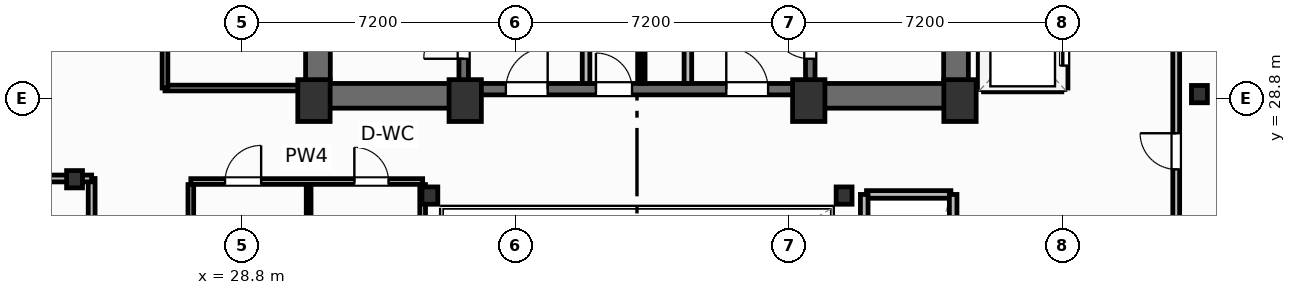
"""IFC4 building model, lengths in metres.
Left out: names, types, materials, properties, quantities, classifications, styles, units other than length and angle.
Written with IfcOpenShell. Run it as: python <this file> out.ifc"""

import sys

from ifc_helpers import new_model, si_unit, direction, frame, frame_2d, origin, origin_2d, place, context, subcontext, project, spatial, rectangle, i_section, extrude, element, fill, save


model = new_model("IFC4")
c1 = context("Model", 3, precision=1e-05, world=origin(), true_north=direction((0.0, 1.0)))
c2 = subcontext(c1, "Body", "Model", "MODEL_VIEW")
j1 = project(units=[si_unit("LENGTHUNIT", "METRE"), si_unit("PLANEANGLEUNIT", "RADIAN")], contexts=[c1])
p1 = place(None, origin())
s1 = spatial("IfcSite", under=j1, at=p1, CompositionType="ELEMENT")
p2 = place(p1, origin())
s2 = spatial("IfcBuilding", under=s1, at=p2, CompositionType="ELEMENT")
p3 = place(p2, frame((0.0, 0.0, 170.9)))
s3 = spatial("IfcBuildingStorey", under=s2, at=p3, CompositionType="ELEMENT", Elevation=170.9)
for number, where, z_axis, x_axis in (
    (1, (30.7, 28.75, 0.0), (0.0, 0.0, 1.0), (1.0, 0.0, 0.0)),
    (2, (34.68, 28.75, 0.0), (0.0, 0.0, 1.0), (1.0, 0.0, 0.0)),
    (3, (43.72, 28.75, 0.0), (0.0, 0.0, 1.0), (1.0, 0.0, 0.0)),
    (4, (47.7, 28.75, 0.0), (0.0, 0.0, 1.0), (1.0, 0.0, 0.0)),
):
    element("IfcColumn", number, at=place(p3, frame(where, z_axis=z_axis, x_axis=x_axis)), inside=s3, PredefinedType="COLUMN", context=c2, shape_type="SweptSolid", body=[
        extrude(rectangle(XDim=0.85, YDim=1.1, at=origin_2d()), origin(), (0.0, 0.0, 1.0), 3.7),
    ])
for number, where, z_axis, x_axis in (
    (5, (33.75, 26.25, 0.0), (0.0, 0.0, 1.0), (1.0, 0.0, 0.0)),
    (6, (44.65, 26.25, 0.0), (0.0, 0.0, 1.0), (1.0, 0.0, 0.0)),
    (7, (24.4, 26.68, 0.0), (0.0, 0.0, 1.0), (1.0, 0.0, 0.0)),
    (8, (54.0, 28.92, 0.0), (0.0, 0.0, 1.0), (1.0, 0.0, 0.0)),
):
    element("IfcColumn", number, at=place(p3, frame(where, z_axis=z_axis, x_axis=x_axis)), inside=s3, PredefinedType="COLUMN", context=c2, shape_type="SweptSolid", body=[
        extrude(i_section(OverallWidth=0.418, OverallDepth=0.455, WebThickness=0.042, FlangeThickness=0.068, FilletRadius=0.025, at=origin_2d()), origin(), (0.0, 0.0, 1.0), 3.7),
    ])
for number, where, z_axis, x_axis in (
    (9, (30.805, 29.2, 0.0), (0.0, 0.0, 1.0), (0.0, 1.0, 0.0)),
    (10, (47.595, 29.2, 0.0), (0.0, 0.0, 1.0), (0.0, 1.0, 0.0)),
):
    element("IfcWall", number, at=place(p3, frame(where, z_axis=z_axis, x_axis=x_axis)), inside=s3, PredefinedType="SHEAR", context=c2, shape_type="SweptSolid", body=[
        extrude(rectangle(XDim=9.22, YDim=0.65, at=frame_2d((4.61, 0.0))), origin(), (0.0, 0.0, 1.0), 3.45),
    ])
p4 = place(p3, frame((30.48, 28.875, 0.0), z_axis=(0.0, 0.0, 1.0), x_axis=(1.0, 0.0, 0.0)))
e11 = element("IfcWall", 11, at=p4, inside=s3, PredefinedType="SHEAR", context=c2, shape_type="SweptSolid", body=[
    extrude(rectangle(XDim=4.32, YDim=0.65, at=frame_2d((2.16, 0.0))), origin(), (0.0, 0.0, 1.0), 3.45),
])
p5 = place(p3, frame((43.6, 28.875, 0.0), z_axis=(0.0, 0.0, 1.0), x_axis=(1.0, 0.0, 0.0)))
e12 = element("IfcWall", 12, at=p5, inside=s3, PredefinedType="SHEAR", context=c2, shape_type="SweptSolid", body=[
    extrude(rectangle(XDim=4.32, YDim=0.65, at=frame_2d((2.16, 0.0))), origin(), (0.0, 0.0, 1.0), 3.45),
])
p6 = place(p3, frame((34.8, 29.05, 0.0), z_axis=(0.0, 0.0, 1.0), x_axis=(1.0, 0.0, 0.0)))
e13 = element("IfcWall", 13, at=p6, inside=s3, PredefinedType="SHEAR", context=c2, shape_type="SweptSolid", body=[
    extrude(rectangle(XDim=8.8, YDim=0.3, at=frame_2d((4.4, 0.0))), origin(), (0.0, 0.0, 1.0), 3.45),
])
p7 = place(p6, frame((0.95, 0.0, 0.0)))
e14 = element("IfcOpeningElement", 14, at=p7, cuts=e13, PredefinedType="OPENING", context=c2, shape_type="SweptSolid", body=[
    extrude(rectangle(XDim=1.1, YDim=2.15, at=frame_2d((0.55, 1.075))), frame((0.0, 0.16, 0.0), z_axis=(0.0, -1.0, 0.0), x_axis=(1.0, 0.0, 0.0)), (0.0, 0.0, 1.0), 0.32),
])
p8 = place(p6, frame((6.75, 0.0, 0.0)))
e15 = element("IfcOpeningElement", 15, at=p8, cuts=e13, PredefinedType="OPENING", context=c2, shape_type="SweptSolid", body=[
    extrude(rectangle(XDim=1.1, YDim=2.15, at=frame_2d((0.55, 1.075))), frame((0.0, 0.16, 0.0), z_axis=(0.0, -1.0, 0.0), x_axis=(1.0, 0.0, 0.0)), (0.0, 0.0, 1.0), 0.32),
])
p9 = place(p6, frame((3.32, 0.0, 0.0)))
e16 = element("IfcOpeningElement", 16, at=p9, cuts=e13, PredefinedType="OPENING", context=c2, shape_type="SweptSolid", body=[
    extrude(rectangle(XDim=0.95, YDim=2.15, at=frame_2d((0.475, 1.075))), frame((0.0, 0.16, 0.0), z_axis=(0.0, -1.0, 0.0), x_axis=(1.0, 0.0, 0.0)), (0.0, 0.0, 1.0), 0.32),
])
p10 = place(p3, frame((34.64, 29.2, 0.0), z_axis=(0.0, 0.0, 1.0), x_axis=(0.0, 1.0, 0.0)))
e17 = element("IfcWall", 17, at=p10, inside=s3, PredefinedType="SHEAR", context=c2, shape_type="SweptSolid", body=[
    extrude(rectangle(XDim=9.22, YDim=0.25, at=frame_2d((4.61, 0.0))), origin(), (0.0, 0.0, 1.0), 3.45),
])
p11 = place(p10, frame((0.65, 0.0, 0.0)))
e18 = element("IfcOpeningElement", 18, at=p11, cuts=e17, PredefinedType="OPENING", context=c2, shape_type="SweptSolid", body=[
    extrude(rectangle(XDim=1.05, YDim=2.15, at=frame_2d((0.525, 1.075))), frame((0.0, 0.135, 0.0), z_axis=(0.0, -1.0, 0.0), x_axis=(1.0, 0.0, 0.0)), (0.0, 0.0, 1.0), 0.27),
])
p12 = place(p3, frame((43.76, 29.2, 0.0), z_axis=(0.0, 0.0, 1.0), x_axis=(0.0, 1.0, 0.0)))
e19 = element("IfcWall", 19, at=p12, inside=s3, PredefinedType="SHEAR", context=c2, shape_type="SweptSolid", body=[
    extrude(rectangle(XDim=9.22, YDim=0.25, at=frame_2d((4.61, 0.0))), origin(), (0.0, 0.0, 1.0), 3.45),
])
p13 = place(p12, frame((0.65, 0.0, 0.0)))
e20 = element("IfcOpeningElement", 20, at=p13, cuts=e19, PredefinedType="OPENING", context=c2, shape_type="SweptSolid", body=[
    extrude(rectangle(XDim=1.05, YDim=2.15, at=frame_2d((0.525, 1.075))), frame((0.0, 0.135, 0.0), z_axis=(0.0, -1.0, 0.0), x_axis=(1.0, 0.0, 0.0)), (0.0, 0.0, 1.0), 0.27),
])
p14 = place(p3, frame((24.85, 19.2, 0.0), z_axis=(0.0, 0.0, 1.0), x_axis=(0.0, 1.0, 0.0)))
e21 = element("IfcWall", 21, at=p14, inside=s3, PredefinedType="PARTITIONING", context=c2, shape_type="SweptSolid", body=[
    extrude(rectangle(XDim=7.5, YDim=0.18, at=frame_2d((3.75, 0.0))), origin(), (0.0, 0.0, 1.0), 3.45),
])
p15 = place(p14, frame((3.275, 0.0, 0.0)))
e22 = element("IfcOpeningElement", 22, at=p15, cuts=e21, PredefinedType="OPENING", context=c2, shape_type="SweptSolid", body=[
    extrude(rectangle(XDim=0.95, YDim=2.05, at=frame_2d((0.475, 1.025))), frame((0.0, 0.1, 0.0), z_axis=(0.0, -1.0, 0.0), x_axis=(1.0, 0.0, 0.0)), (0.0, 0.0, 1.0), 0.2),
])
p16 = place(p3, frame((3.653, 26.7, 0.0), z_axis=(0.0, 0.0, 1.0), x_axis=(1.0, 0.0, 0.0)))
e23 = element("IfcWall", 23, at=p16, inside=s3, PredefinedType="PARTITIONING", context=c2, shape_type="SweptSolid", body=[
    extrude(rectangle(XDim=21.197, YDim=0.18, at=frame_2d((10.599, 0.0))), origin(), (0.0, 0.0, 1.0), 2.662),
])
p17 = place(p3, frame((53.39, 19.24, 0.0), z_axis=(0.0, 0.0, 1.0), x_axis=(0.0, 1.0, 0.0)))
e24 = element("IfcWall", 24, at=p17, inside=s3, PredefinedType="PARTITIONING", context=c2, shape_type="SweptSolid", body=[
    extrude(rectangle(XDim=20.06, YDim=0.18, at=frame_2d((10.03, 0.0))), origin(), (0.0, 0.0, 1.0), 3.45),
])
p18 = place(p17, frame((7.7, 0.0, 0.0)))
e25 = element("IfcOpeningElement", 25, at=p18, cuts=e24, PredefinedType="OPENING", context=c2, shape_type="SweptSolid", body=[
    extrude(rectangle(XDim=0.95, YDim=2.05, at=frame_2d((0.475, 1.025))), frame((0.0, 0.1, 0.0), z_axis=(0.0, -1.0, 0.0), x_axis=(1.0, 0.0, 0.0)), (0.0, 0.0, 1.0), 0.2),
])
for number, where, z_axis, x_axis in (
    (26, (37.86, 29.2, 0.0), (0.0, 0.0, 1.0), (0.0, 1.0, 0.0)),
    (27, (40.54, 29.2, 0.0), (0.0, 0.0, 1.0), (0.0, 1.0, 0.0)),
):
    element("IfcWall", number, at=place(p3, frame(where, z_axis=z_axis, x_axis=x_axis)), inside=s3, PredefinedType="PARTITIONING", context=c2, shape_type="SweptSolid", body=[
        extrude(rectangle(XDim=5.18, YDim=0.2, at=frame_2d((2.59, 0.0))), origin(), (0.0, 0.0, 1.0), 3.45),
    ])
p19 = place(p3, frame((39.35, 29.2, 0.0), z_axis=(0.0, 0.0, 1.0), x_axis=(0.0, 1.0, 0.0)))
e28 = element("IfcWall", 28, at=p19, inside=s3, PredefinedType="PARTITIONING", context=c2, shape_type="SweptSolid", body=[
    extrude(rectangle(XDim=5.22, YDim=0.125, at=frame_2d((2.61, 0.0))), origin(), (0.0, 0.0, 1.0), 3.45),
])
p20 = place(p19, frame((2.05, 0.0, 0.0)))
e29 = element("IfcOpeningElement", 29, at=p20, cuts=e28, PredefinedType="OPENING", context=c2, shape_type="SweptSolid", body=[
    extrude(rectangle(XDim=0.85, YDim=2.05, at=frame_2d((0.425, 1.025))), frame((0.0, 0.073, 0.0), z_axis=(0.0, -1.0, 0.0), x_axis=(1.0, 0.0, 0.0)), (0.0, 0.0, 1.0), 0.145),
])
p21 = place(p3, frame((27.46, 26.62, 0.0), z_axis=(0.0, 0.0, 1.0), x_axis=(1.0, 0.0, 0.0)))
e30 = element("IfcWall", 30, at=p21, inside=s3, PredefinedType="PARTITIONING", context=c2, shape_type="SweptSolid", body=[
    extrude(rectangle(XDim=6.1, YDim=0.15, at=frame_2d((3.05, 0.0))), origin(), (0.0, 0.0, 1.0), 2.662),
])
p22 = place(p21, frame((0.9, 0.0, 0.0)))
e31 = element("IfcOpeningElement", 31, at=p22, cuts=e30, PredefinedType="OPENING", context=c2, shape_type="SweptSolid", body=[
    extrude(rectangle(XDim=0.95, YDim=2.05, at=frame_2d((0.475, 1.025))), frame((0.0, 0.085, 0.0), z_axis=(0.0, -1.0, 0.0), x_axis=(1.0, 0.0, 0.0)), (0.0, 0.0, 1.0), 0.17),
])
p23 = place(p21, frame((4.303, 0.0, 0.0)))
e32 = element("IfcOpeningElement", 32, at=p23, cuts=e30, PredefinedType="OPENING", context=c2, shape_type="SweptSolid", body=[
    extrude(rectangle(XDim=0.9, YDim=2.05, at=frame_2d((0.45, 1.025))), frame((0.0, 0.085, 0.0), z_axis=(0.0, -1.0, 0.0), x_axis=(1.0, 0.0, 0.0)), (0.0, 0.0, 1.0), 0.17),
])
p24 = place(p3, frame((30.56, 19.38, 0.0), z_axis=(0.0, 0.0, 1.0), x_axis=(0.0, 1.0, 0.0)))
e33 = element("IfcWall", 33, at=p24, inside=s3, PredefinedType="PARTITIONING", context=c2, shape_type="SweptSolid", body=[
    extrude(rectangle(XDim=7.16, YDim=0.125, at=frame_2d((3.58, 0.0))), origin(), (0.0, 0.0, 1.0), 3.45),
])
p25 = place(p24, frame((1.4, 0.0, 0.0)))
e34 = element("IfcOpeningElement", 34, at=p25, cuts=e33, PredefinedType="OPENING", context=c2, shape_type="SweptSolid", body=[
    extrude(rectangle(XDim=0.92, YDim=2.05, at=frame_2d((0.46, 1.025))), frame((0.0, 0.073, 0.0), z_axis=(0.0, -1.0, 0.0), x_axis=(1.0, 0.0, 0.0)), (0.0, 0.0, 1.0), 0.145),
])
p26 = place(p3, frame((27.46, 19.38, 0.0), z_axis=(0.0, 0.0, 1.0), x_axis=(0.0, 1.0, 0.0)))
e35 = element("IfcWall", 35, at=p26, inside=s3, PredefinedType="PARTITIONING", context=c2, shape_type="SweptSolid", body=[
    extrude(rectangle(XDim=7.16, YDim=0.15, at=frame_2d((3.58, 0.0))), origin(), (0.0, 0.0, 1.0), 3.45),
])
p27 = place(p3, frame((33.56, 19.38, 0.0), z_axis=(0.0, 0.0, 1.0), x_axis=(0.0, 1.0, 0.0)))
e36 = element("IfcWall", 36, at=p27, inside=s3, PredefinedType="PARTITIONING", context=c2, shape_type="SweptSolid", body=[
    extrude(rectangle(XDim=7.16, YDim=0.15, at=frame_2d((3.58, 0.0))), origin(), (0.0, 0.0, 1.0), 2.824),
])
p28 = place(p3, frame((26.78, 29.08, 0.0), z_axis=(0.0, 0.0, 1.0), x_axis=(1.0, 0.0, 0.0)))
e37 = element("IfcWall", 37, at=p28, inside=s3, PredefinedType="PARTITIONING", context=c2, shape_type="SweptSolid", body=[
    extrude(rectangle(XDim=3.7, YDim=0.15, at=frame_2d((1.85, 0.0))), origin(), (0.0, 0.0, 1.0), 3.45),
])
p29 = place(p3, frame((26.78, 29.08, 0.0), z_axis=(0.0, 0.0, 1.0), x_axis=(0.0, 1.0, 0.0)))
e38 = element("IfcWall", 38, at=p29, inside=s3, PredefinedType="PARTITIONING", context=c2, shape_type="SweptSolid", body=[
    extrude(rectangle(XDim=9.18, YDim=0.15, at=frame_2d((4.59, 0.0))), origin(), (0.0, 0.0, 1.0), 3.45),
])
p30 = place(p29, frame((2.4, 0.0, 0.0)))
e39 = element("IfcOpeningElement", 39, at=p30, cuts=e38, PredefinedType="OPENING", context=c2, shape_type="SweptSolid", body=[
    extrude(rectangle(XDim=0.95, YDim=2.05, at=frame_2d((0.475, 1.025))), frame((0.0, 0.085, 0.0), z_axis=(0.0, -1.0, 0.0), x_axis=(1.0, 0.0, 0.0)), (0.0, 0.0, 1.0), 0.17),
])
p31 = place(p3, frame((48.32, 29.08, 0.0), z_axis=(0.0, 0.0, 1.0), x_axis=(1.0, 0.0, 0.0)))
e40 = element("IfcWall", 40, at=p31, inside=s3, PredefinedType="PARTITIONING", context=c2, shape_type="SweptSolid", body=[
    extrude(rectangle(XDim=2.06, YDim=0.2, at=frame_2d((1.03, 0.0))), origin(), (0.0, 0.0, 1.0), 2.662),
])
p32 = place(p3, frame((48.28, 29.08, 0.0), z_axis=(0.0, 0.0, 1.0), x_axis=(0.0, 1.0, 0.0)))
e41 = element("IfcWall", 41, at=p32, inside=s3, PredefinedType="PARTITIONING", context=c2, shape_type="SweptSolid", body=[
    extrude(rectangle(XDim=6.89, YDim=0.2, at=frame_2d((3.445, 0.0))), origin(), (0.0, 0.0, 1.0), 3.45),
])
p33 = place(p3, frame((50.44, 29.08, 0.0), z_axis=(0.0, 0.0, 1.0), x_axis=(0.0, 1.0, 0.0)))
e42 = element("IfcWall", 42, at=p33, inside=s3, PredefinedType="PARTITIONING", context=c2, shape_type="SweptSolid", body=[
    extrude(rectangle(XDim=6.89, YDim=0.2, at=frame_2d((3.445, 0.0))), origin(), (0.0, 0.0, 1.0), 3.45),
])
p34 = place(p33, frame((0.59, 0.0, 0.0)))
e43 = element("IfcOpeningElement", 43, at=p34, cuts=e42, PredefinedType="OPENING", context=c2, shape_type="SweptSolid", body=[
    extrude(rectangle(XDim=1.1, YDim=2.15, at=frame_2d((0.55, 1.075))), frame((0.0, 0.11, 0.0), z_axis=(0.0, -1.0, 0.0), x_axis=(1.0, 0.0, 0.0)), (0.0, 0.0, 1.0), 0.22),
])
p35 = place(p33, frame((2.89, 0.0, 0.0)))
e44 = element("IfcOpeningElement", 44, at=p35, cuts=e42, PredefinedType="OPENING", context=c2, shape_type="SweptSolid", body=[
    extrude(rectangle(XDim=1.1, YDim=2.15, at=frame_2d((0.55, 1.075))), frame((0.0, 0.11, 0.0), z_axis=(0.0, -1.0, 0.0), x_axis=(1.0, 0.0, 0.0)), (0.0, 0.0, 1.0), 0.22),
])
p36 = place(p33, frame((5.19, 0.0, 0.0)))
e45 = element("IfcOpeningElement", 45, at=p36, cuts=e42, PredefinedType="OPENING", context=c2, shape_type="SweptSolid", body=[
    extrude(rectangle(XDim=1.1, YDim=2.15, at=frame_2d((0.55, 1.075))), frame((0.0, 0.11, 0.0), z_axis=(0.0, -1.0, 0.0), x_axis=(1.0, 0.0, 0.0)), (0.0, 0.0, 1.0), 0.22),
])
p37 = place(p3, frame((45.24, 26.28, 0.0), z_axis=(0.0, 0.0, 1.0), x_axis=(1.0, 0.0, 0.0)))
e46 = element("IfcWall", 46, at=p37, inside=s3, PredefinedType="PARTITIONING", context=c2, shape_type="SweptSolid", body=[
    extrude(rectangle(XDim=2.22, YDim=0.2, at=frame_2d((1.11, 0.0))), origin(), (0.0, 0.0, 1.0), 3.45),
])
for number, where, z_axis, x_axis in (
    (47, (45.18, 19.38, 0.0), (0.0, 0.0, 1.0), (0.0, 1.0, 0.0)),
    (48, (47.52, 19.38, 0.0), (0.0, 0.0, 1.0), (0.0, 1.0, 0.0)),
):
    element("IfcWall", number, at=place(p3, frame(where, z_axis=z_axis, x_axis=x_axis)), inside=s3, PredefinedType="PARTITIONING", context=c2, shape_type="SweptSolid", body=[
        extrude(rectangle(XDim=6.9, YDim=0.2, at=frame_2d((3.45, 0.0))), origin(), (0.0, 0.0, 1.0), 3.45),
    ])
p38 = place(p18, origin())
e49 = element("IfcDoor", 49, at=p38, inside=s3, OperationType="SINGLE_SWING_RIGHT", PredefinedType="DOOR", context=c2, shape_type="SweptSolid", body=[
    extrude(rectangle(XDim=0.95, YDim=2.05, at=frame_2d((0.475, 1.025))), frame((0.0, 0.025, 0.0), z_axis=(0.0, -1.0, 0.0), x_axis=(1.0, 0.0, 0.0)), (0.0, 0.0, 1.0), 0.05),
])
fill(e25, e49)
p39 = place(p11, origin())
e50 = element("IfcDoor", 50, at=p39, inside=s3, OperationType="SINGLE_SWING_LEFT", PredefinedType="DOOR", context=c2, shape_type="SweptSolid", body=[
    extrude(rectangle(XDim=1.05, YDim=2.15, at=frame_2d((0.525, 1.075))), frame((0.0, 0.025, 0.0), z_axis=(0.0, -1.0, 0.0), x_axis=(1.0, 0.0, 0.0)), (0.0, 0.0, 1.0), 0.05),
])
fill(e18, e50)
p40 = place(p13, origin())
e51 = element("IfcDoor", 51, at=p40, inside=s3, OperationType="SINGLE_SWING_RIGHT", PredefinedType="DOOR", context=c2, shape_type="SweptSolid", body=[
    extrude(rectangle(XDim=1.05, YDim=2.15, at=frame_2d((0.525, 1.075))), frame((0.0, 0.025, 0.0), z_axis=(0.0, -1.0, 0.0), x_axis=(1.0, 0.0, 0.0)), (0.0, 0.0, 1.0), 0.05),
])
fill(e20, e51)
p41 = place(p7, origin())
e52 = element("IfcDoor", 52, at=p41, inside=s3, OperationType="SINGLE_SWING_RIGHT", PredefinedType="DOOR", context=c2, shape_type="SweptSolid", body=[
    extrude(rectangle(XDim=1.1, YDim=2.15, at=frame_2d((0.55, 1.075))), frame((0.0, 0.025, 0.0), z_axis=(0.0, -1.0, 0.0), x_axis=(1.0, 0.0, 0.0)), (0.0, 0.0, 1.0), 0.05),
])
fill(e14, e52)
p42 = place(p8, origin())
e53 = element("IfcDoor", 53, at=p42, inside=s3, OperationType="SINGLE_SWING_LEFT", PredefinedType="DOOR", context=c2, shape_type="SweptSolid", body=[
    extrude(rectangle(XDim=1.1, YDim=2.15, at=frame_2d((0.55, 1.075))), frame((0.0, 0.025, 0.0), z_axis=(0.0, -1.0, 0.0), x_axis=(1.0, 0.0, 0.0)), (0.0, 0.0, 1.0), 0.05),
])
fill(e15, e53)
p43 = place(p9, origin())
e54 = element("IfcDoor", 54, at=p43, inside=s3, OperationType="SINGLE_SWING_LEFT", PredefinedType="DOOR", context=c2, shape_type="SweptSolid", body=[
    extrude(rectangle(XDim=0.95, YDim=2.15, at=frame_2d((0.475, 1.075))), frame((0.0, 0.025, 0.0), z_axis=(0.0, -1.0, 0.0), x_axis=(1.0, 0.0, 0.0)), (0.0, 0.0, 1.0), 0.05),
])
fill(e16, e54)
p44 = place(p22, origin())
e55 = element("IfcDoor", 55, at=p44, inside=s3, OperationType="SINGLE_SWING_RIGHT", PredefinedType="DOOR", context=c2, shape_type="SweptSolid", body=[
    extrude(rectangle(XDim=0.95, YDim=2.05, at=frame_2d((0.475, 1.025))), frame((0.0, 0.025, 0.0), z_axis=(0.0, -1.0, 0.0), x_axis=(1.0, 0.0, 0.0)), (0.0, 0.0, 1.0), 0.05),
])
fill(e31, e55)
p45 = place(p23, origin())
e56 = element("IfcDoor", 56, at=p45, inside=s3, OperationType="SINGLE_SWING_LEFT", PredefinedType="DOOR", context=c2, shape_type="SweptSolid", body=[
    extrude(rectangle(XDim=0.9, YDim=2.05, at=frame_2d((0.45, 1.025))), frame((0.0, 0.025, 0.0), z_axis=(0.0, -1.0, 0.0), x_axis=(1.0, 0.0, 0.0)), (0.0, 0.0, 1.0), 0.05),
])
fill(e32, e56)
p46 = place(p34, origin())
e57 = element("IfcDoor", 57, at=p46, inside=s3, OperationType="SLIDING_TO_LEFT", PredefinedType="DOOR", context=c2, shape_type="SweptSolid", body=[
    extrude(rectangle(XDim=1.1, YDim=2.15, at=frame_2d((0.55, 1.075))), frame((0.0, 0.025, 0.0), z_axis=(0.0, -1.0, 0.0), x_axis=(1.0, 0.0, 0.0)), (0.0, 0.0, 1.0), 0.05),
])
fill(e43, e57)
save(model, sys.argv[1])
